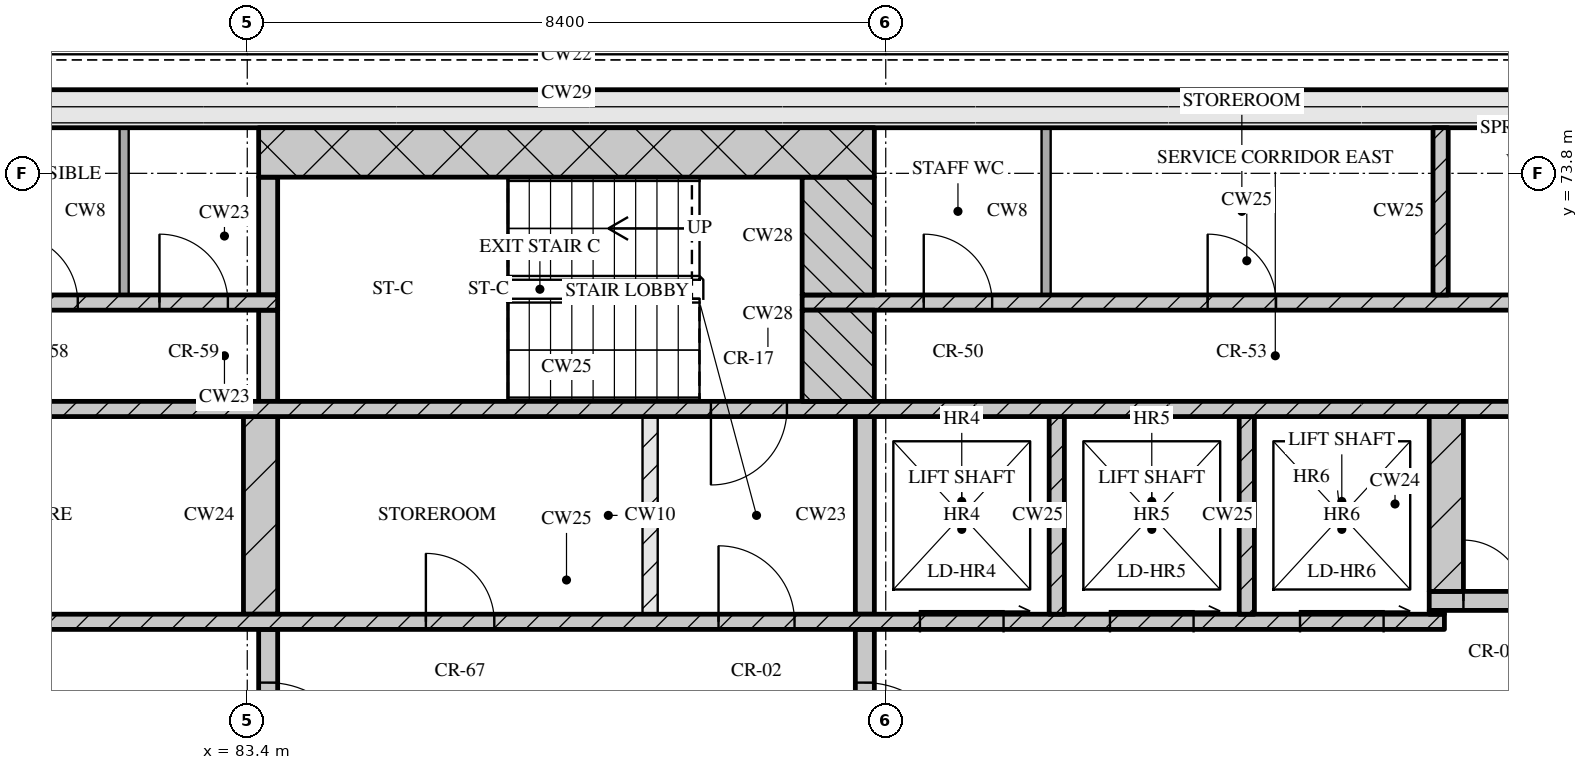
"""IFC4 building model, lengths in metres.
Left out: names, types, materials, properties, quantities, classifications, styles, units other than length and angle.
Written with IfcOpenShell. Run it as: python <this file> out.ifc"""

import sys

from ifc_helpers import new_model, si_unit, direction, frame, frame_2d, origin, place, context, subcontext, project, spatial, rectangle, extrude, element, fill, save


model = new_model("IFC4")
c1 = context("Model", 3, precision=1e-05, world=origin(), true_north=direction((0.0, 1.0)))
c2 = subcontext(c1, "Body", "Model", "MODEL_VIEW")
j1 = project(units=[si_unit("LENGTHUNIT", "METRE"), si_unit("PLANEANGLEUNIT", "RADIAN")], contexts=[c1])
p1 = place(None, origin())
s1 = spatial("IfcSite", under=j1, at=p1, CompositionType="ELEMENT")
p2 = place(p1, origin())
s2 = spatial("IfcBuilding", under=s1, at=p2, CompositionType="ELEMENT")
p3 = place(p2, frame((0.0, 0.0, 270.75)))
s3 = spatial("IfcBuildingStorey", under=s2, at=p3, CompositionType="ELEMENT", Elevation=270.75)
p4 = place(p3, frame((67.3, 74.65, 0.0), z_axis=(0.0, 0.0, 1.0), x_axis=(1.0, 0.0, 0.0)))
e1 = element("IfcWall", 1, at=p4, inside=s3, PredefinedType="SOLIDWALL", context=c2, shape_type="SweptSolid", body=[
    extrude(rectangle(XDim=40.6, YDim=0.5, at=frame_2d((20.3, 0.0))), origin(), (0.0, 0.0, 1.0), 3.32),
])
p5 = place(p3, frame((83.675, 65.2, 0.0), z_axis=(0.0, 0.0, 1.0), x_axis=(0.0, 1.0, 0.0)))
e2 = element("IfcWall", 2, at=p5, inside=s3, PredefinedType="SOLIDWALL", context=c2, shape_type="SweptSolid", body=[
    extrude(rectangle(XDim=2.6, YDim=0.25, at=frame_2d((1.3, 0.0))), origin(), (0.0, 0.0, 1.0), 3.32),
])
p6 = place(p5, frame((0.7, 0.0, 0.0)))
e3 = element("IfcOpeningElement", 3, at=p6, cuts=e2, PredefinedType="OPENING", context=c2, shape_type="SweptSolid", body=[
    extrude(rectangle(XDim=1.2, YDim=2.1, at=frame_2d((0.6, 1.05))), frame((0.0, 0.135, 0.0), z_axis=(0.0, -1.0, 0.0), x_axis=(1.0, 0.0, 0.0)), (0.0, 0.0, 1.0), 0.27),
])
p7 = place(p3, frame((91.525, 65.2, 0.0), z_axis=(0.0, 0.0, 1.0), x_axis=(0.0, 1.0, 0.0)))
e4 = element("IfcWall", 4, at=p7, inside=s3, PredefinedType="SOLIDWALL", context=c2, shape_type="SweptSolid", body=[
    extrude(rectangle(XDim=2.6, YDim=0.25, at=frame_2d((1.3, 0.0))), origin(), (0.0, 0.0, 1.0), 3.32),
])
p8 = place(p7, frame((0.7, 0.0, 0.0)))
e5 = element("IfcOpeningElement", 5, at=p8, cuts=e4, PredefinedType="OPENING", context=c2, shape_type="SweptSolid", body=[
    extrude(rectangle(XDim=1.2, YDim=2.1, at=frame_2d((0.6, 1.05))), frame((0.0, 0.135, 0.0), z_axis=(0.0, -1.0, 0.0), x_axis=(1.0, 0.0, 0.0)), (0.0, 0.0, 1.0), 0.27),
])
p9 = place(p3, frame((76.05, 67.9, 0.0), z_axis=(0.0, 0.0, 1.0), x_axis=(1.0, 0.0, 0.0)))
e6 = element("IfcWall", 6, at=p9, inside=s3, PredefinedType="SOLIDWALL", context=c2, shape_type="SweptSolid", body=[
    extrude(rectangle(XDim=23.1, YDim=0.2, at=frame_2d((11.55, 0.0))), origin(), (0.0, 0.0, 1.0), 3.32),
])
p10 = place(p9, frame((3.2, 0.0, 0.0)))
e7 = element("IfcOpeningElement", 7, at=p10, cuts=e6, PredefinedType="OPENING", context=c2, shape_type="SweptSolid", body=[
    extrude(rectangle(XDim=0.9, YDim=2.1, at=frame_2d((0.45, 1.05))), frame((0.0, 0.11, 0.0), z_axis=(0.0, -1.0, 0.0), x_axis=(1.0, 0.0, 0.0)), (0.0, 0.0, 1.0), 0.22),
])
p11 = place(p9, frame((9.7, 0.0, 0.0)))
e8 = element("IfcOpeningElement", 8, at=p11, cuts=e6, PredefinedType="OPENING", context=c2, shape_type="SweptSolid", body=[
    extrude(rectangle(XDim=0.9, YDim=2.1, at=frame_2d((0.45, 1.05))), frame((0.0, 0.11, 0.0), z_axis=(0.0, -1.0, 0.0), x_axis=(1.0, 0.0, 0.0)), (0.0, 0.0, 1.0), 0.22),
])
p12 = place(p9, frame((13.55, 0.0, 0.0)))
e9 = element("IfcOpeningElement", 9, at=p12, cuts=e6, PredefinedType="OPENING", context=c2, shape_type="SweptSolid", body=[
    extrude(rectangle(XDim=1.0, YDim=2.1, at=frame_2d((0.5, 1.05))), frame((0.0, 0.11, 0.0), z_axis=(0.0, -1.0, 0.0), x_axis=(1.0, 0.0, 0.0)), (0.0, 0.0, 1.0), 0.22),
])
p13 = place(p9, frame((16.2, 0.0, 0.0)))
e10 = element("IfcOpeningElement", 10, at=p13, cuts=e6, PredefinedType="OPENING", context=c2, shape_type="SweptSolid", body=[
    extrude(rectangle(XDim=1.1, YDim=2.1, at=frame_2d((0.55, 1.05))), frame((0.0, 0.11, 0.0), z_axis=(0.0, -1.0, 0.0), x_axis=(1.0, 0.0, 0.0)), (0.0, 0.0, 1.0), 0.22),
])
p14 = place(p9, frame((18.7, 0.0, 0.0)))
e11 = element("IfcOpeningElement", 11, at=p14, cuts=e6, PredefinedType="OPENING", context=c2, shape_type="SweptSolid", body=[
    extrude(rectangle(XDim=1.1, YDim=2.1, at=frame_2d((0.55, 1.05))), frame((0.0, 0.11, 0.0), z_axis=(0.0, -1.0, 0.0), x_axis=(1.0, 0.0, 0.0)), (0.0, 0.0, 1.0), 0.22),
])
p15 = place(p9, frame((21.2, 0.0, 0.0)))
e12 = element("IfcOpeningElement", 12, at=p15, cuts=e6, PredefinedType="OPENING", context=c2, shape_type="SweptSolid", body=[
    extrude(rectangle(XDim=1.1, YDim=2.1, at=frame_2d((0.55, 1.05))), frame((0.0, 0.11, 0.0), z_axis=(0.0, -1.0, 0.0), x_axis=(1.0, 0.0, 0.0)), (0.0, 0.0, 1.0), 0.22),
])
p16 = place(p3, frame((83.575, 68.0, 0.0), z_axis=(0.0, 0.0, 1.0), x_axis=(0.0, 1.0, 0.0)))
e13 = element("IfcWall", 13, at=p16, inside=s3, PredefinedType="SOLIDWALL", context=c2, shape_type="SweptSolid", body=[
    extrude(rectangle(XDim=2.6, YDim=0.45, at=frame_2d((1.3, 0.0))), origin(), (0.0, 0.0, 1.0), 3.32),
])
p17 = place(p3, frame((88.7, 68.0, 0.0), z_axis=(0.0, 0.0, 1.0), x_axis=(0.0, 1.0, 0.0)))
e14 = element("IfcWall", 14, at=p17, inside=s3, PredefinedType="PARTITIONING", context=c2, shape_type="SweptSolid", body=[
    extrude(rectangle(XDim=2.6, YDim=0.2, at=frame_2d((1.3, 0.0))), origin(), (0.0, 0.0, 1.0), 3.32),
])
p18 = place(p3, frame((91.525, 68.0, 0.0), z_axis=(0.0, 0.0, 1.0), x_axis=(0.0, 1.0, 0.0)))
e15 = element("IfcWall", 15, at=p18, inside=s3, PredefinedType="SOLIDWALL", context=c2, shape_type="SweptSolid", body=[
    extrude(rectangle(XDim=2.6, YDim=0.25, at=frame_2d((1.3, 0.0))), origin(), (0.0, 0.0, 1.0), 3.32),
])
for number, where, z_axis, x_axis in (
    (16, (94.05, 68.0, 0.0), (0.0, 0.0, 1.0), (0.0, 1.0, 0.0)),
    (17, (96.55, 68.0, 0.0), (0.0, 0.0, 1.0), (0.0, 1.0, 0.0)),
):
    element("IfcWall", number, at=place(p3, frame(where, z_axis=z_axis, x_axis=x_axis)), inside=s3, PredefinedType="SOLIDWALL", context=c2, shape_type="SweptSolid", body=[
        extrude(rectangle(XDim=2.6, YDim=0.2, at=frame_2d((1.3, 0.0))), origin(), (0.0, 0.0, 1.0), 3.32),
    ])
p19 = place(p3, frame((98.95, 68.025, 0.0), z_axis=(0.0, 0.0, 1.0), x_axis=(1.0, 0.0, 0.0)))
e18 = element("IfcWall", 18, at=p19, inside=s3, PredefinedType="SOLIDWALL", context=c2, shape_type="SweptSolid", body=[
    extrude(rectangle(XDim=0.2, YDim=0.05, at=frame_2d((0.1, 0.0))), origin(), (0.0, 0.0, 1.0), 3.32),
])
p20 = place(p3, frame((98.95, 68.175, 0.0), z_axis=(0.0, 0.0, 1.0), x_axis=(1.0, 0.0, 0.0)))
e19 = element("IfcWall", 19, at=p20, inside=s3, PredefinedType="SOLIDWALL", context=c2, shape_type="SweptSolid", body=[
    extrude(rectangle(XDim=8.45, YDim=0.25, at=frame_2d((4.225, 0.0))), origin(), (0.0, 0.0, 1.0), 3.32),
])
p21 = place(p20, frame((0.45, 0.0, 0.0)))
e20 = element("IfcOpeningElement", 20, at=p21, cuts=e19, PredefinedType="OPENING", context=c2, shape_type="SweptSolid", body=[
    extrude(rectangle(XDim=0.8, YDim=2.1, at=frame_2d((0.4, 1.05))), frame((0.0, 0.135, 0.0), z_axis=(0.0, -1.0, 0.0), x_axis=(1.0, 0.0, 0.0)), (0.0, 0.0, 1.0), 0.27),
])
p22 = place(p20, frame((1.75, 0.0, 0.0)))
e21 = element("IfcOpeningElement", 21, at=p22, cuts=e19, PredefinedType="OPENING", context=c2, shape_type="SweptSolid", body=[
    extrude(rectangle(XDim=1.0, YDim=2.1, at=frame_2d((0.5, 1.05))), frame((0.0, 0.135, 0.0), z_axis=(0.0, -1.0, 0.0), x_axis=(1.0, 0.0, 0.0)), (0.0, 0.0, 1.0), 0.27),
])
p23 = place(p3, frame((99.175, 68.3, 0.0), z_axis=(0.0, 0.0, 1.0), x_axis=(0.0, 1.0, 0.0)))
e22 = element("IfcWall", 22, at=p23, inside=s3, PredefinedType="SOLIDWALL", context=c2, shape_type="SweptSolid", body=[
    extrude(rectangle(XDim=2.3, YDim=0.45, at=frame_2d((1.15, 0.0))), origin(), (0.0, 0.0, 1.0), 3.32),
])
p24 = place(p3, frame((67.8, 70.7, 0.0), z_axis=(0.0, 0.0, 1.0), x_axis=(1.0, 0.0, 0.0)))
e23 = element("IfcWall", 23, at=p24, inside=s3, PredefinedType="SOLIDWALL", context=c2, shape_type="SweptSolid", body=[
    extrude(rectangle(XDim=39.6, YDim=0.2, at=frame_2d((19.8, 0.0))), origin(), (0.0, 0.0, 1.0), 3.32),
])
p25 = place(p24, frame((0.65, 0.0, 0.0)))
e24 = element("IfcOpeningElement", 24, at=p25, cuts=e23, PredefinedType="OPENING", context=c2, shape_type="SweptSolid", body=[
    extrude(rectangle(XDim=1.1, YDim=2.1, at=frame_2d((0.55, 1.05))), frame((0.0, 0.11, 0.0), z_axis=(0.0, -1.0, 0.0), x_axis=(1.0, 0.0, 0.0)), (0.0, 0.0, 1.0), 0.22),
])
p26 = place(p24, frame((3.25, 0.0, 0.0)))
e25 = element("IfcOpeningElement", 25, at=p26, cuts=e23, PredefinedType="OPENING", context=c2, shape_type="SweptSolid", body=[
    extrude(rectangle(XDim=1.1, YDim=2.1, at=frame_2d((0.55, 1.05))), frame((0.0, 0.11, 0.0), z_axis=(0.0, -1.0, 0.0), x_axis=(1.0, 0.0, 0.0)), (0.0, 0.0, 1.0), 0.22),
])
p27 = place(p24, frame((5.9, 0.0, 0.0)))
e26 = element("IfcOpeningElement", 26, at=p27, cuts=e23, PredefinedType="OPENING", context=c2, shape_type="SweptSolid", body=[
    extrude(rectangle(XDim=1.0, YDim=2.1, at=frame_2d((0.5, 1.05))), frame((0.0, 0.11, 0.0), z_axis=(0.0, -1.0, 0.0), x_axis=(1.0, 0.0, 0.0)), (0.0, 0.0, 1.0), 0.22),
])
p28 = place(p24, frame((21.7, 0.0, 0.0)))
e27 = element("IfcOpeningElement", 27, at=p28, cuts=e23, PredefinedType="OPENING", context=c2, shape_type="SweptSolid", body=[
    extrude(rectangle(XDim=1.0, YDim=2.1, at=frame_2d((0.5, 1.05))), frame((0.0, 0.11, 0.0), z_axis=(0.0, -1.0, 0.0), x_axis=(1.0, 0.0, 0.0)), (0.0, 0.0, 1.0), 0.22),
])
p29 = place(p24, frame((32.7, 0.0, 0.0)))
e28 = element("IfcOpeningElement", 28, at=p29, cuts=e23, PredefinedType="OPENING", context=c2, shape_type="SweptSolid", body=[
    extrude(rectangle(XDim=1.0, YDim=2.1, at=frame_2d((0.5, 1.05))), frame((0.0, 0.11, 0.0), z_axis=(0.0, -1.0, 0.0), x_axis=(1.0, 0.0, 0.0)), (0.0, 0.0, 1.0), 0.22),
])
p30 = place(p24, frame((35.25, 0.0, 0.0)))
e29 = element("IfcOpeningElement", 29, at=p30, cuts=e23, PredefinedType="OPENING", context=c2, shape_type="SweptSolid", body=[
    extrude(rectangle(XDim=1.1, YDim=2.1, at=frame_2d((0.55, 1.05))), frame((0.0, 0.11, 0.0), z_axis=(0.0, -1.0, 0.0), x_axis=(1.0, 0.0, 0.0)), (0.0, 0.0, 1.0), 0.22),
])
p31 = place(p24, frame((37.85, 0.0, 0.0)))
e30 = element("IfcOpeningElement", 30, at=p31, cuts=e23, PredefinedType="OPENING", context=c2, shape_type="SweptSolid", body=[
    extrude(rectangle(XDim=1.1, YDim=2.1, at=frame_2d((0.55, 1.05))), frame((0.0, 0.11, 0.0), z_axis=(0.0, -1.0, 0.0), x_axis=(1.0, 0.0, 0.0)), (0.0, 0.0, 1.0), 0.22),
])
p32 = place(p3, frame((83.675, 70.8, 0.0), z_axis=(0.0, 0.0, 1.0), x_axis=(0.0, 1.0, 0.0)))
e31 = element("IfcWall", 31, at=p32, inside=s3, PredefinedType="SOLIDWALL", context=c2, shape_type="SweptSolid", body=[
    extrude(rectangle(XDim=1.2, YDim=0.25, at=frame_2d((0.6, 0.0))), origin(), (0.0, 0.0, 1.0), 3.32),
])
p33 = place(p3, frame((91.175, 70.8, 0.0), z_axis=(0.0, 0.0, 1.0), x_axis=(0.0, 1.0, 0.0)))
e32 = element("IfcWall", 32, at=p33, inside=s3, PredefinedType="SOLIDWALL", context=c2, shape_type="SweptSolid", body=[
    extrude(rectangle(XDim=1.2, YDim=0.95, at=frame_2d((0.6, 0.0))), origin(), (0.0, 0.0, 1.0), 3.32),
])
p34 = place(p3, frame((72.8, 72.1, 0.0), z_axis=(0.0, 0.0, 1.0), x_axis=(1.0, 0.0, 0.0)))
e33 = element("IfcWall", 33, at=p34, inside=s3, PredefinedType="SOLIDWALL", context=c2, shape_type="SweptSolid", body=[
    extrude(rectangle(XDim=11.0, YDim=0.2, at=frame_2d((5.5, 0.0))), origin(), (0.0, 0.0, 1.0), 3.32),
])
p35 = place(p34, frame((1.25, 0.0, 0.0)))
e34 = element("IfcOpeningElement", 34, at=p35, cuts=e33, PredefinedType="OPENING", context=c2, shape_type="SweptSolid", body=[
    extrude(rectangle(XDim=0.9, YDim=2.1, at=frame_2d((0.45, 1.05))), frame((0.0, 0.11, 0.0), z_axis=(0.0, -1.0, 0.0), x_axis=(1.0, 0.0, 0.0)), (0.0, 0.0, 1.0), 0.22),
])
p36 = place(p34, frame((4.65, 0.0, 0.0)))
e35 = element("IfcOpeningElement", 35, at=p36, cuts=e33, PredefinedType="OPENING", context=c2, shape_type="SweptSolid", body=[
    extrude(rectangle(XDim=0.9, YDim=2.1, at=frame_2d((0.45, 1.05))), frame((0.0, 0.11, 0.0), z_axis=(0.0, -1.0, 0.0), x_axis=(1.0, 0.0, 0.0)), (0.0, 0.0, 1.0), 0.22),
])
p37 = place(p34, frame((7.47, 0.0, 0.0)))
e36 = element("IfcOpeningElement", 36, at=p37, cuts=e33, PredefinedType="OPENING", context=c2, shape_type="SweptSolid", body=[
    extrude(rectangle(XDim=0.9, YDim=2.1, at=frame_2d((0.45, 1.05))), frame((0.0, 0.11, 0.0), z_axis=(0.0, -1.0, 0.0), x_axis=(1.0, 0.0, 0.0)), (0.0, 0.0, 1.0), 0.22),
])
p38 = place(p34, frame((9.445, 0.0, 0.0)))
e37 = element("IfcOpeningElement", 37, at=p38, cuts=e33, PredefinedType="OPENING", context=c2, shape_type="SweptSolid", body=[
    extrude(rectangle(XDim=0.9, YDim=2.1, at=frame_2d((0.45, 1.05))), frame((0.0, 0.11, 0.0), z_axis=(0.0, -1.0, 0.0), x_axis=(1.0, 0.0, 0.0)), (0.0, 0.0, 1.0), 0.22),
])
p39 = place(p3, frame((90.7, 72.1, 0.0), z_axis=(0.0, 0.0, 1.0), x_axis=(1.0, 0.0, 0.0)))
e38 = element("IfcWall", 38, at=p39, inside=s3, PredefinedType="SOLIDWALL", context=c2, shape_type="SweptSolid", body=[
    extrude(rectangle(XDim=11.7, YDim=0.2, at=frame_2d((5.85, 0.0))), origin(), (0.0, 0.0, 1.0), 3.32),
])
p40 = place(p39, frame((1.6, 0.0, 0.0)))
e39 = element("IfcOpeningElement", 39, at=p40, cuts=e38, PredefinedType="OPENING", context=c2, shape_type="SweptSolid", body=[
    extrude(rectangle(XDim=0.9, YDim=2.1, at=frame_2d((0.45, 1.05))), frame((0.0, 0.11, 0.0), z_axis=(0.0, -1.0, 0.0), x_axis=(1.0, 0.0, 0.0)), (0.0, 0.0, 1.0), 0.22),
])
p41 = place(p39, frame((5.335, 0.0, 0.0)))
e40 = element("IfcOpeningElement", 40, at=p41, cuts=e38, PredefinedType="OPENING", context=c2, shape_type="SweptSolid", body=[
    extrude(rectangle(XDim=0.9, YDim=2.1, at=frame_2d((0.45, 1.05))), frame((0.0, 0.11, 0.0), z_axis=(0.0, -1.0, 0.0), x_axis=(1.0, 0.0, 0.0)), (0.0, 0.0, 1.0), 0.22),
])
p42 = place(p39, frame((9.55, 0.0, 0.0)))
e41 = element("IfcOpeningElement", 41, at=p42, cuts=e38, PredefinedType="OPENING", context=c2, shape_type="SweptSolid", body=[
    extrude(rectangle(XDim=0.9, YDim=2.1, at=frame_2d((0.45, 1.05))), frame((0.0, 0.11, 0.0), z_axis=(0.0, -1.0, 0.0), x_axis=(1.0, 0.0, 0.0)), (0.0, 0.0, 1.0), 0.22),
])
p43 = place(p3, frame((81.78, 72.2, 0.0), z_axis=(0.0, 0.0, 1.0), x_axis=(0.0, 1.0, 0.0)))
e42 = element("IfcWall", 42, at=p43, inside=s3, PredefinedType="PARTITIONING", context=c2, shape_type="SweptSolid", body=[
    extrude(rectangle(XDim=2.2, YDim=0.12, at=frame_2d((1.1, 0.0))), origin(), (0.0, 0.0, 1.0), 3.32),
])
p44 = place(p3, frame((83.675, 72.2, 0.0), z_axis=(0.0, 0.0, 1.0), x_axis=(0.0, 1.0, 0.0)))
e43 = element("IfcWall", 43, at=p44, inside=s3, PredefinedType="SOLIDWALL", context=c2, shape_type="SweptSolid", body=[
    extrude(rectangle(XDim=1.55, YDim=0.25, at=frame_2d((0.775, 0.0))), origin(), (0.0, 0.0, 1.0), 3.32),
])
p45 = place(p3, frame((91.175, 72.2, 0.0), z_axis=(0.0, 0.0, 1.0), x_axis=(0.0, 1.0, 0.0)))
e44 = element("IfcWall", 44, at=p45, inside=s3, PredefinedType="SOLIDWALL", context=c2, shape_type="SweptSolid", body=[
    extrude(rectangle(XDim=1.55, YDim=0.95, at=frame_2d((0.775, 0.0))), origin(), (0.0, 0.0, 1.0), 3.32),
])
p46 = place(p3, frame((93.91, 72.2, 0.0), z_axis=(0.0, 0.0, 1.0), x_axis=(0.0, 1.0, 0.0)))
e45 = element("IfcWall", 45, at=p46, inside=s3, PredefinedType="PARTITIONING", context=c2, shape_type="SweptSolid", body=[
    extrude(rectangle(XDim=2.2, YDim=0.12, at=frame_2d((1.1, 0.0))), origin(), (0.0, 0.0, 1.0), 3.32),
])
p47 = place(p3, frame((99.1, 72.2, 0.0), z_axis=(0.0, 0.0, 1.0), x_axis=(0.0, 1.0, 0.0)))
e46 = element("IfcWall", 46, at=p47, inside=s3, PredefinedType="SOLIDWALL", context=c2, shape_type="SweptSolid", body=[
    extrude(rectangle(XDim=2.2, YDim=0.2, at=frame_2d((1.1, 0.0))), origin(), (0.0, 0.0, 1.0), 3.32),
])
p48 = place(p3, frame((83.55, 74.075, 0.0), z_axis=(0.0, 0.0, 1.0), x_axis=(1.0, 0.0, 0.0)))
e47 = element("IfcWall", 47, at=p48, inside=s3, PredefinedType="SOLIDWALL", context=c2, shape_type="SweptSolid", body=[
    extrude(rectangle(XDim=8.1, YDim=0.65, at=frame_2d((4.05, 0.0))), origin(), (0.0, 0.0, 1.0), 3.32),
])
p49 = place(p6, origin())
e48 = element("IfcDoor", 48, at=p49, inside=s3, OperationType="SINGLE_SWING_RIGHT", PredefinedType="DOOR", context=c2, shape_type="SweptSolid", body=[
    extrude(rectangle(XDim=1.2, YDim=2.1, at=frame_2d((0.6, 1.05))), frame((0.0, 0.025, 0.0), z_axis=(0.0, -1.0, 0.0), x_axis=(1.0, 0.0, 0.0)), (0.0, 0.0, 1.0), 0.05),
])
fill(e3, e48)
p50 = place(p8, origin())
e49 = element("IfcDoor", 49, at=p50, inside=s3, OperationType="SINGLE_SWING_RIGHT", PredefinedType="DOOR", context=c2, shape_type="SweptSolid", body=[
    extrude(rectangle(XDim=1.2, YDim=2.1, at=frame_2d((0.6, 1.05))), frame((0.0, 0.025, 0.0), z_axis=(0.0, -1.0, 0.0), x_axis=(1.0, 0.0, 0.0)), (0.0, 0.0, 1.0), 0.05),
])
fill(e5, e49)
p51 = place(p11, origin())
e50 = element("IfcDoor", 50, at=p51, inside=s3, OperationType="SINGLE_SWING_LEFT", PredefinedType="DOOR", context=c2, shape_type="SweptSolid", body=[
    extrude(rectangle(XDim=0.9, YDim=2.1, at=frame_2d((0.45, 1.05))), frame((0.0, 0.025, 0.0), z_axis=(0.0, -1.0, 0.0), x_axis=(1.0, 0.0, 0.0)), (0.0, 0.0, 1.0), 0.05),
])
fill(e8, e50)
p52 = place(p12, origin())
e51 = element("IfcDoor", 51, at=p52, inside=s3, OperationType="SINGLE_SWING_LEFT", PredefinedType="DOOR", context=c2, shape_type="SweptSolid", body=[
    extrude(rectangle(XDim=1.0, YDim=2.1, at=frame_2d((0.5, 1.05))), frame((0.0, 0.025, 0.0), z_axis=(0.0, -1.0, 0.0), x_axis=(1.0, 0.0, 0.0)), (0.0, 0.0, 1.0), 0.05),
])
fill(e9, e51)
p53 = place(p13, origin())
e52 = element("IfcDoor", 52, at=p53, inside=s3, OperationType="SLIDING_TO_RIGHT", PredefinedType="DOOR", context=c2, shape_type="SweptSolid", body=[
    extrude(rectangle(XDim=1.1, YDim=2.1, at=frame_2d((0.55, 1.05))), frame((0.0, 0.025, 0.0), z_axis=(0.0, -1.0, 0.0), x_axis=(1.0, 0.0, 0.0)), (0.0, 0.0, 1.0), 0.05),
])
fill(e10, e52)
p54 = place(p14, origin())
e53 = element("IfcDoor", 53, at=p54, inside=s3, OperationType="SLIDING_TO_RIGHT", PredefinedType="DOOR", context=c2, shape_type="SweptSolid", body=[
    extrude(rectangle(XDim=1.1, YDim=2.1, at=frame_2d((0.55, 1.05))), frame((0.0, 0.025, 0.0), z_axis=(0.0, -1.0, 0.0), x_axis=(1.0, 0.0, 0.0)), (0.0, 0.0, 1.0), 0.05),
])
fill(e11, e53)
p55 = place(p15, origin())
e54 = element("IfcDoor", 54, at=p55, inside=s3, OperationType="SLIDING_TO_RIGHT", PredefinedType="DOOR", context=c2, shape_type="SweptSolid", body=[
    extrude(rectangle(XDim=1.1, YDim=2.1, at=frame_2d((0.55, 1.05))), frame((0.0, 0.025, 0.0), z_axis=(0.0, -1.0, 0.0), x_axis=(1.0, 0.0, 0.0)), (0.0, 0.0, 1.0), 0.05),
])
fill(e12, e54)
p56 = place(p21, origin())
e55 = element("IfcDoor", 55, at=p56, inside=s3, OperationType="SINGLE_SWING_LEFT", PredefinedType="DOOR", context=c2, shape_type="SweptSolid", body=[
    extrude(rectangle(XDim=0.8, YDim=2.1, at=frame_2d((0.4, 1.05))), frame((0.0, 0.025, 0.0), z_axis=(0.0, -1.0, 0.0), x_axis=(1.0, 0.0, 0.0)), (0.0, 0.0, 1.0), 0.05),
])
fill(e20, e55)
p57 = place(p28, origin())
e56 = element("IfcDoor", 56, at=p57, inside=s3, OperationType="SINGLE_SWING_RIGHT", PredefinedType="DOOR", context=c2, shape_type="SweptSolid", body=[
    extrude(rectangle(XDim=1.0, YDim=2.1, at=frame_2d((0.5, 1.05))), frame((0.0, 0.025, 0.0), z_axis=(0.0, -1.0, 0.0), x_axis=(1.0, 0.0, 0.0)), (0.0, 0.0, 1.0), 0.05),
])
fill(e27, e56)
p58 = place(p37, origin())
e57 = element("IfcDoor", 57, at=p58, inside=s3, OperationType="SINGLE_SWING_LEFT", PredefinedType="DOOR", context=c2, shape_type="SweptSolid", body=[
    extrude(rectangle(XDim=0.9, YDim=2.1, at=frame_2d((0.45, 1.05))), frame((0.0, 0.025, 0.0), z_axis=(0.0, -1.0, 0.0), x_axis=(1.0, 0.0, 0.0)), (0.0, 0.0, 1.0), 0.05),
])
fill(e36, e57)
p59 = place(p38, origin())
e58 = element("IfcDoor", 58, at=p59, inside=s3, OperationType="SINGLE_SWING_LEFT", PredefinedType="DOOR", context=c2, shape_type="SweptSolid", body=[
    extrude(rectangle(XDim=0.9, YDim=2.1, at=frame_2d((0.45, 1.05))), frame((0.0, 0.025, 0.0), z_axis=(0.0, -1.0, 0.0), x_axis=(1.0, 0.0, 0.0)), (0.0, 0.0, 1.0), 0.05),
])
fill(e37, e58)
p60 = place(p40, origin())
e59 = element("IfcDoor", 59, at=p60, inside=s3, OperationType="SINGLE_SWING_LEFT", PredefinedType="DOOR", context=c2, shape_type="SweptSolid", body=[
    extrude(rectangle(XDim=0.9, YDim=2.1, at=frame_2d((0.45, 1.05))), frame((0.0, 0.025, 0.0), z_axis=(0.0, -1.0, 0.0), x_axis=(1.0, 0.0, 0.0)), (0.0, 0.0, 1.0), 0.05),
])
fill(e39, e59)
p61 = place(p41, origin())
e60 = element("IfcDoor", 60, at=p61, inside=s3, OperationType="SINGLE_SWING_LEFT", PredefinedType="DOOR", context=c2, shape_type="SweptSolid", body=[
    extrude(rectangle(XDim=0.9, YDim=2.1, at=frame_2d((0.45, 1.05))), frame((0.0, 0.025, 0.0), z_axis=(0.0, -1.0, 0.0), x_axis=(1.0, 0.0, 0.0)), (0.0, 0.0, 1.0), 0.05),
])
fill(e40, e60)
save(model, sys.argv[1])
